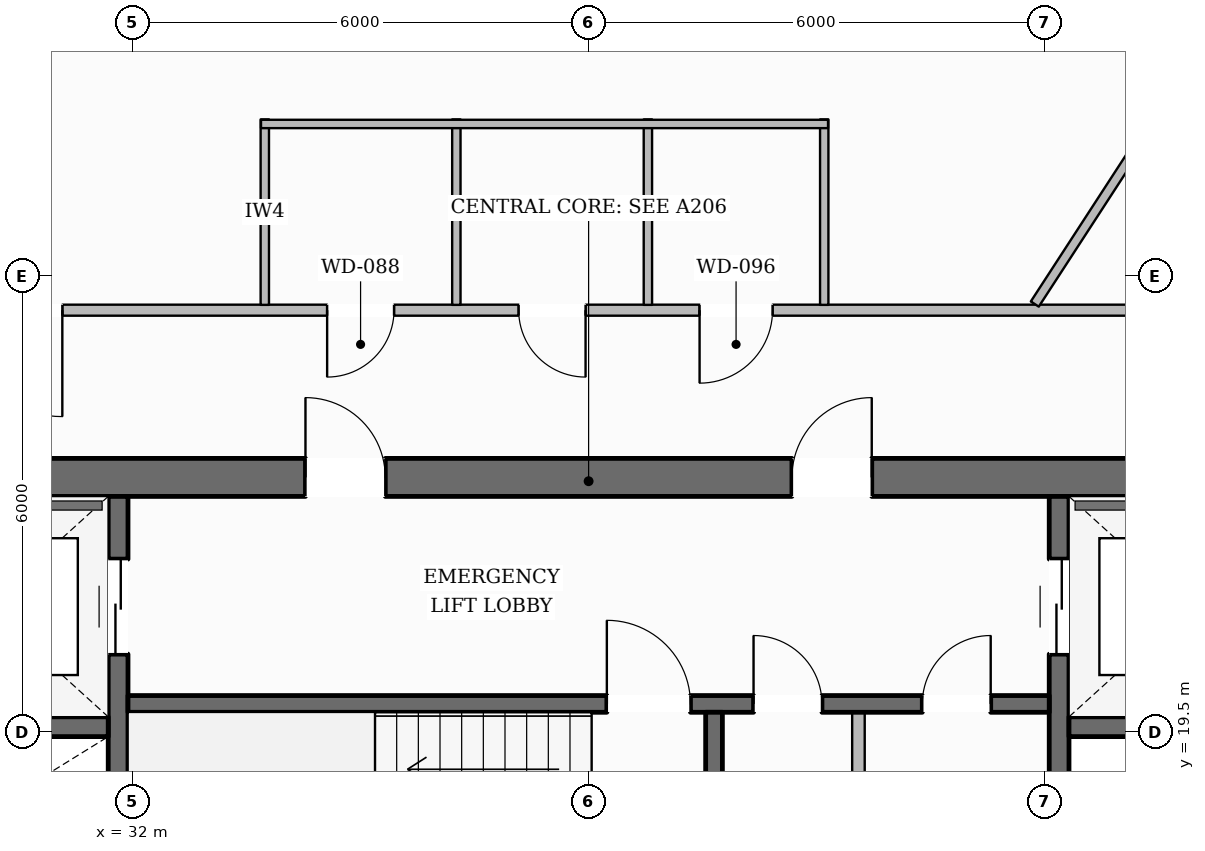
"""IFC4 building model, lengths in metres.
Left out: names, types, materials, properties, quantities, classifications, styles, units other than length and angle.
Written with IfcOpenShell. Run it as: python <this file> out.ifc"""

import sys

from ifc_helpers import new_model, si_unit, direction, frame, frame_2d, origin, place, context, subcontext, project, spatial, rectangle, extrude, element, fill, save


model = new_model("IFC4")
c1 = context("Model", 3, precision=1e-05, world=origin(), true_north=direction((0.0, 1.0)))
c2 = subcontext(c1, "Body", "Model", "MODEL_VIEW")
j1 = project(units=[si_unit("LENGTHUNIT", "METRE"), si_unit("PLANEANGLEUNIT", "RADIAN")], contexts=[c1])
p1 = place(None, origin())
s1 = spatial("IfcSite", under=j1, at=p1, CompositionType="ELEMENT")
p2 = place(p1, origin())
s2 = spatial("IfcBuilding", under=s1, at=p2, CompositionType="ELEMENT")
p3 = place(p2, frame((0.0, 0.0, 143.25)))
s3 = spatial("IfcBuildingStorey", under=s2, at=p3, CompositionType="ELEMENT", Elevation=143.25)
p4 = place(p3, frame((27.98, 22.85, 0.0), z_axis=(0.0, 0.0, 1.0), x_axis=(1.0, 0.0, 0.0)))
e1 = element("IfcWall", 1, at=p4, inside=s3, PredefinedType="SOLIDWALL", context=c2, shape_type="SweptSolid", body=[
    extrude(rectangle(XDim=20.04, YDim=0.5, at=frame_2d((10.02, 0.0))), origin(), (0.0, 0.0, 1.0), 3.6),
])
p5 = place(p4, frame((6.295, 0.0, 0.0)))
e2 = element("IfcOpeningElement", 2, at=p5, cuts=e1, PredefinedType="OPENING", context=c2, shape_type="SweptSolid", body=[
    extrude(rectangle(XDim=1.05, YDim=2.15, at=frame_2d((0.525, 1.075))), frame((0.0, 0.26, 0.0), z_axis=(0.0, -1.0, 0.0), x_axis=(1.0, 0.0, 0.0)), (0.0, 0.0, 1.0), 0.52),
])
p6 = place(p4, frame((12.695, 0.0, 0.0)))
e3 = element("IfcOpeningElement", 3, at=p6, cuts=e1, PredefinedType="OPENING", context=c2, shape_type="SweptSolid", body=[
    extrude(rectangle(XDim=1.05, YDim=2.15, at=frame_2d((0.525, 1.075))), frame((0.0, 0.26, 0.0), z_axis=(0.0, -1.0, 0.0), x_axis=(1.0, 0.0, 0.0)), (0.0, 0.0, 1.0), 0.52),
])
p7 = place(p3, frame((31.81, 9.6, 0.0), z_axis=(0.0, 0.0, 1.0), x_axis=(0.0, 1.0, 0.0)))
e4 = element("IfcWall", 4, at=p7, inside=s3, PredefinedType="SHEAR", context=c2, shape_type="SweptSolid", body=[
    extrude(rectangle(XDim=13.0, YDim=0.26, at=frame_2d((6.5, 0.0))), origin(), (0.0, 0.0, 1.0), 3.6),
])
p8 = place(p7, frame((10.925, 0.0, 0.0)))
e5 = element("IfcOpeningElement", 5, at=p8, cuts=e4, PredefinedType="OPENING", context=c2, shape_type="SweptSolid", body=[
    extrude(rectangle(XDim=1.25, YDim=2.25, at=frame_2d((0.625, 1.125))), frame((0.0, 0.14, 0.0), z_axis=(0.0, -1.0, 0.0), x_axis=(1.0, 0.0, 0.0)), (0.0, 0.0, 1.0), 0.28),
])
p9 = place(p3, frame((44.19, 9.6, 0.0), z_axis=(0.0, 0.0, 1.0), x_axis=(0.0, 1.0, 0.0)))
e6 = element("IfcWall", 6, at=p9, inside=s3, PredefinedType="SHEAR", context=c2, shape_type="SweptSolid", body=[
    extrude(rectangle(XDim=13.0, YDim=0.26, at=frame_2d((6.5, 0.0))), origin(), (0.0, 0.0, 1.0), 3.6),
])
p10 = place(p9, frame((10.925, 0.0, 0.0)))
e7 = element("IfcOpeningElement", 7, at=p10, cuts=e6, PredefinedType="OPENING", context=c2, shape_type="SweptSolid", body=[
    extrude(rectangle(XDim=1.25, YDim=2.25, at=frame_2d((0.625, 1.125))), frame((0.0, 0.14, 0.0), z_axis=(0.0, -1.0, 0.0), x_axis=(1.0, 0.0, 0.0)), (0.0, 0.0, 1.0), 0.28),
])
for number, where, z_axis, x_axis in (
    (8, (28.48, 19.57, 0.0), (0.0, 0.0, 1.0), (1.0, 0.0, 0.0)),
    (9, (44.32, 19.57, 0.0), (0.0, 0.0, 1.0), (1.0, 0.0, 0.0)),
):
    element("IfcWall", number, at=place(p3, frame(where, z_axis=z_axis, x_axis=x_axis)), inside=s3, PredefinedType="SHEAR", context=c2, shape_type="SweptSolid", body=[
        extrude(rectangle(XDim=3.2, YDim=0.26, at=frame_2d((1.6, 0.0))), origin(), (0.0, 0.0, 1.0), 3.6),
    ])
p11 = place(p3, frame((31.94, 19.87, 0.0), z_axis=(0.0, 0.0, 1.0), x_axis=(1.0, 0.0, 0.0)))
e10 = element("IfcWall", 10, at=p11, inside=s3, PredefinedType="SOLIDWALL", context=c2, shape_type="SweptSolid", body=[
    extrude(rectangle(XDim=12.12, YDim=0.22, at=frame_2d((6.06, 0.0))), origin(), (0.0, 0.0, 1.0), 3.6),
])
p12 = place(p11, frame((6.3, 0.0, 0.0)))
e11 = element("IfcOpeningElement", 11, at=p12, cuts=e10, PredefinedType="OPENING", context=c2, shape_type="SweptSolid", body=[
    extrude(rectangle(XDim=1.1, YDim=2.15, at=frame_2d((0.55, 1.075))), frame((0.0, 0.12, 0.0), z_axis=(0.0, -1.0, 0.0), x_axis=(1.0, 0.0, 0.0)), (0.0, 0.0, 1.0), 0.24),
])
p13 = place(p11, frame((8.23, 0.0, 0.0)))
e12 = element("IfcOpeningElement", 12, at=p13, cuts=e10, PredefinedType="OPENING", context=c2, shape_type="SweptSolid", body=[
    extrude(rectangle(XDim=0.9, YDim=2.1, at=frame_2d((0.45, 1.05))), frame((0.0, 0.12, 0.0), z_axis=(0.0, -1.0, 0.0), x_axis=(1.0, 0.0, 0.0)), (0.0, 0.0, 1.0), 0.24),
])
p14 = place(p11, frame((10.45, 0.0, 0.0)))
e13 = element("IfcOpeningElement", 13, at=p14, cuts=e10, PredefinedType="OPENING", context=c2, shape_type="SweptSolid", body=[
    extrude(rectangle(XDim=0.9, YDim=2.1, at=frame_2d((0.45, 1.05))), frame((0.0, 0.12, 0.0), z_axis=(0.0, -1.0, 0.0), x_axis=(1.0, 0.0, 0.0)), (0.0, 0.0, 1.0), 0.24),
])
p15 = place(p3, frame((39.65, 16.56, 0.0), z_axis=(0.0, 0.0, 1.0), x_axis=(0.0, 1.0, 0.0)))
e14 = element("IfcWall", 14, at=p15, inside=s3, PredefinedType="SOLIDWALL", context=c2, shape_type="SweptSolid", body=[
    extrude(rectangle(XDim=3.2, YDim=0.22, at=frame_2d((1.6, 0.0))), origin(), (0.0, 0.0, 1.0), 3.6),
])
p16 = place(p3, frame((13.223, 11.91, 0.0), z_axis=(0.0, 0.0, 1.0), x_axis=(0.505453242286, 0.86285399684, 0.0)))
e15 = element("IfcWall", 15, at=p16, inside=s3, PredefinedType="STANDARD", context=c2, shape_type="SweptSolid", body=[
    extrude(rectangle(XDim=38.125, YDim=0.38, at=frame_2d((19.062, 0.0))), origin(), (0.0, 0.0, 1.0), 3.059),
])
p17 = place(p16, frame((27.994, 0.0, 0.0)))
e16 = element("IfcOpeningElement", 16, at=p17, cuts=e15, PredefinedType="OPENING", context=c2, shape_type="SweptSolid", body=[
    extrude(rectangle(XDim=1.0, YDim=2.2, at=frame_2d((0.5, 1.1))), frame((0.0, 0.2, 0.0), z_axis=(0.0, -1.0, 0.0), x_axis=(1.0, 0.0, 0.0)), (0.0, 0.0, 1.0), 0.4),
])
p18 = place(p16, frame((33.78, 0.0, 0.65)))
e17 = element("IfcOpeningElement", 17, at=p18, cuts=e15, PredefinedType="OPENING", context=c2, shape_type="SweptSolid", body=[
    extrude(rectangle(XDim=1.55, YDim=1.75, at=frame_2d((0.775, 0.875))), frame((0.0, 0.2, 0.0), z_axis=(0.0, -1.0, 0.0), x_axis=(1.0, 0.0, 0.0)), (0.0, 0.0, 1.0), 0.4),
])
p19 = place(p16, frame((21.388, 0.0, 0.65)))
e18 = element("IfcOpeningElement", 18, at=p19, cuts=e15, PredefinedType="OPENING", context=c2, shape_type="SweptSolid", body=[
    extrude(rectangle(XDim=1.55, YDim=1.75, at=frame_2d((0.775, 0.875))), frame((0.0, 0.2, 0.0), z_axis=(0.0, -1.0, 0.0), x_axis=(1.0, 0.0, 0.0)), (0.0, 0.0, 1.0), 0.4),
])
p20 = place(p16, frame((8.997, 0.0, 0.65)))
e19 = element("IfcOpeningElement", 19, at=p20, cuts=e15, PredefinedType="OPENING", context=c2, shape_type="SweptSolid", body=[
    extrude(rectangle(XDim=1.55, YDim=1.75, at=frame_2d((0.775, 0.875))), frame((0.0, 0.2, 0.0), z_axis=(0.0, -1.0, 0.0), x_axis=(1.0, 0.0, 0.0)), (0.0, 0.0, 1.0), 0.4),
])
p21 = place(p16, frame((2.802, 0.0, 0.65)))
e20 = element("IfcOpeningElement", 20, at=p21, cuts=e15, PredefinedType="OPENING", context=c2, shape_type="SweptSolid", body=[
    extrude(rectangle(XDim=1.55, YDim=1.75, at=frame_2d((0.775, 0.875))), frame((0.0, 0.2, 0.0), z_axis=(0.0, -1.0, 0.0), x_axis=(1.0, 0.0, 0.0)), (0.0, 0.0, 1.0), 0.4),
])
p22 = place(p3, frame((43.361, 44.893, 0.0), z_axis=(0.0, 0.0, 1.0), x_axis=(0.499094622433, -0.866547493135, 0.0)))
e21 = element("IfcWall", 21, at=p22, inside=s3, PredefinedType="STANDARD", context=c2, shape_type="SweptSolid", body=[
    extrude(rectangle(XDim=37.644, YDim=0.38, at=frame_2d((18.822, 0.0))), origin(), (0.0, 0.0, 1.0), 3.059),
])
p23 = place(p22, frame((33.333, 0.0, 0.65)))
e22 = element("IfcOpeningElement", 22, at=p23, cuts=e21, PredefinedType="OPENING", context=c2, shape_type="SweptSolid", body=[
    extrude(rectangle(XDim=1.55, YDim=1.75, at=frame_2d((0.775, 0.875))), frame((0.0, 0.2, 0.0), z_axis=(0.0, -1.0, 0.0), x_axis=(1.0, 0.0, 0.0)), (0.0, 0.0, 1.0), 0.4),
])
p24 = place(p22, frame((27.219, 0.0, 0.65)))
e23 = element("IfcOpeningElement", 23, at=p24, cuts=e21, PredefinedType="OPENING", context=c2, shape_type="SweptSolid", body=[
    extrude(rectangle(XDim=1.55, YDim=1.75, at=frame_2d((0.775, 0.875))), frame((0.0, 0.2, 0.0), z_axis=(0.0, -1.0, 0.0), x_axis=(1.0, 0.0, 0.0)), (0.0, 0.0, 1.0), 0.4),
])
p25 = place(p22, frame((21.105, 0.0, 0.65)))
e24 = element("IfcOpeningElement", 24, at=p25, cuts=e21, PredefinedType="OPENING", context=c2, shape_type="SweptSolid", body=[
    extrude(rectangle(XDim=1.55, YDim=1.75, at=frame_2d((0.775, 0.875))), frame((0.0, 0.2, 0.0), z_axis=(0.0, -1.0, 0.0), x_axis=(1.0, 0.0, 0.0)), (0.0, 0.0, 1.0), 0.4),
])
p26 = place(p22, frame((8.876, 0.0, 0.65)))
e25 = element("IfcOpeningElement", 25, at=p26, cuts=e21, PredefinedType="OPENING", context=c2, shape_type="SweptSolid", body=[
    extrude(rectangle(XDim=1.55, YDim=1.75, at=frame_2d((0.775, 0.875))), frame((0.0, 0.2, 0.0), z_axis=(0.0, -1.0, 0.0), x_axis=(1.0, 0.0, 0.0)), (0.0, 0.0, 1.0), 0.4),
])
p27 = place(p22, frame((2.762, 0.0, 0.65)))
e26 = element("IfcOpeningElement", 26, at=p27, cuts=e21, PredefinedType="OPENING", context=c2, shape_type="SweptSolid", body=[
    extrude(rectangle(XDim=1.55, YDim=1.75, at=frame_2d((0.775, 0.875))), frame((0.0, 0.2, 0.0), z_axis=(0.0, -1.0, 0.0), x_axis=(1.0, 0.0, 0.0)), (0.0, 0.0, 1.0), 0.4),
])
p28 = place(p3, frame((41.55, 16.56, 0.0), z_axis=(0.0, 0.0, 1.0), x_axis=(0.0, 1.0, 0.0)))
e27 = element("IfcWall", 27, at=p28, inside=s3, PredefinedType="PARTITIONING", context=c2, shape_type="SweptSolid", body=[
    extrude(rectangle(XDim=3.2, YDim=0.165, at=frame_2d((1.6, 0.0))), origin(), (0.0, 0.0, 1.0), 3.6),
])
p29 = place(p3, frame((49.97, 25.05, 0.0), z_axis=(0.0, 0.0, 1.0), x_axis=(-1.0, 0.0, 0.0)))
e28 = element("IfcWall", 28, at=p29, inside=s3, PredefinedType="PARTITIONING", context=c2, shape_type="SweptSolid", body=[
    extrude(rectangle(XDim=23.94, YDim=0.145, at=frame_2d((11.97, 0.0))), origin(), (0.0, 0.0, 1.0), 3.6),
])
p30 = place(p29, frame((14.53, 0.0, 0.0)))
e29 = element("IfcOpeningElement", 29, at=p30, cuts=e28, PredefinedType="OPENING", context=c2, shape_type="SweptSolid", body=[
    extrude(rectangle(XDim=0.88, YDim=2.1, at=frame_2d((0.44, 1.05))), frame((0.0, 0.083, 0.0), z_axis=(0.0, -1.0, 0.0), x_axis=(1.0, 0.0, 0.0)), (0.0, 0.0, 1.0), 0.165),
])
p31 = place(p29, frame((12.01, 0.0, 0.0)))
e30 = element("IfcOpeningElement", 30, at=p31, cuts=e28, PredefinedType="OPENING", context=c2, shape_type="SweptSolid", body=[
    extrude(rectangle(XDim=0.88, YDim=2.1, at=frame_2d((0.44, 1.05))), frame((0.0, 0.083, 0.0), z_axis=(0.0, -1.0, 0.0), x_axis=(1.0, 0.0, 0.0)), (0.0, 0.0, 1.0), 0.165),
])
p32 = place(p29, frame((9.55, 0.0, 0.0)))
e31 = element("IfcOpeningElement", 31, at=p32, cuts=e28, PredefinedType="OPENING", context=c2, shape_type="SweptSolid", body=[
    extrude(rectangle(XDim=0.96, YDim=2.1, at=frame_2d((0.48, 1.05))), frame((0.0, 0.083, 0.0), z_axis=(0.0, -1.0, 0.0), x_axis=(1.0, 0.0, 0.0)), (0.0, 0.0, 1.0), 0.165),
])
p33 = place(p29, frame((18.894, 0.0, 0.0)))
e32 = element("IfcOpeningElement", 32, at=p33, cuts=e28, PredefinedType="OPENING", context=c2, shape_type="SweptSolid", body=[
    extrude(rectangle(XDim=1.4, YDim=2.2, at=frame_2d((0.7, 1.1))), frame((0.0, 0.083, 0.0), z_axis=(0.0, -1.0, 0.0), x_axis=(1.0, 0.0, 0.0)), (0.0, 0.0, 1.0), 0.165),
])
for number, where, z_axis, x_axis in (
    (33, (33.74, 25.12, 0.0), (0.0, 0.0, 1.0), (0.0, 1.0, 0.0)),
    (34, (36.26, 25.12, 0.0), (0.0, 0.0, 1.0), (0.0, 1.0, 0.0)),
    (35, (38.78, 25.12, 0.0), (0.0, 0.0, 1.0), (0.0, 1.0, 0.0)),
    (36, (41.1, 25.12, 0.0), (0.0, 0.0, 1.0), (0.0, 1.0, 0.0)),
):
    element("IfcWall", number, at=place(p3, frame(where, z_axis=z_axis, x_axis=x_axis)), inside=s3, PredefinedType="PLUMBINGWALL", context=c2, shape_type="SweptSolid", body=[
        extrude(rectangle(XDim=2.44, YDim=0.11, at=frame_2d((1.22, 0.0))), origin(), (0.0, 0.0, 1.0), 3.6),
    ])
p34 = place(p3, frame((33.69, 27.5, 0.0), z_axis=(0.0, 0.0, 1.0), x_axis=(1.0, 0.0, 0.0)))
e37 = element("IfcWall", 37, at=p34, inside=s3, PredefinedType="PLUMBINGWALL", context=c2, shape_type="SweptSolid", body=[
    extrude(rectangle(XDim=7.46, YDim=0.11, at=frame_2d((3.73, 0.0))), origin(), (0.0, 0.0, 1.0), 3.6),
])
p35 = place(p3, frame((43.87, 25.131, 0.0), z_axis=(0.0, 0.0, 1.0), x_axis=(0.545017140764, 0.838424901988, 0.0)))
e38 = element("IfcWall", 38, at=p35, inside=s3, PredefinedType="PARTITIONING", context=c2, shape_type="SweptSolid", body=[
    extrude(rectangle(XDim=9.836, YDim=0.125, at=frame_2d((4.918, 0.0))), origin(), (0.0, 0.0, 1.0), 3.6),
])
p36 = place(p12, origin())
e39 = element("IfcDoor", 39, at=p36, inside=s3, OperationType="SINGLE_SWING_LEFT", PredefinedType="DOOR", context=c2, shape_type="SweptSolid", body=[
    extrude(rectangle(XDim=1.1, YDim=2.15, at=frame_2d((0.55, 1.075))), frame((0.0, 0.025, 0.0), z_axis=(0.0, -1.0, 0.0), x_axis=(1.0, 0.0, 0.0)), (0.0, 0.0, 1.0), 0.05),
])
fill(e11, e39)
p37 = place(p5, origin())
e40 = element("IfcDoor", 40, at=p37, inside=s3, OperationType="SINGLE_SWING_LEFT", PredefinedType="DOOR", context=c2, shape_type="SweptSolid", body=[
    extrude(rectangle(XDim=1.05, YDim=2.15, at=frame_2d((0.525, 1.075))), frame((0.0, 0.025, 0.0), z_axis=(0.0, -1.0, 0.0), x_axis=(1.0, 0.0, 0.0)), (0.0, 0.0, 1.0), 0.05),
])
fill(e2, e40)
p38 = place(p6, origin())
e41 = element("IfcDoor", 41, at=p38, inside=s3, OperationType="SINGLE_SWING_RIGHT", PredefinedType="DOOR", context=c2, shape_type="SweptSolid", body=[
    extrude(rectangle(XDim=1.05, YDim=2.15, at=frame_2d((0.525, 1.075))), frame((0.0, 0.025, 0.0), z_axis=(0.0, -1.0, 0.0), x_axis=(1.0, 0.0, 0.0)), (0.0, 0.0, 1.0), 0.05),
])
fill(e3, e41)
p39 = place(p8, origin())
e42 = element("IfcDoor", 42, at=p39, inside=s3, OperationType="DOUBLE_DOOR_SLIDING", PredefinedType="DOOR", context=c2, shape_type="SweptSolid", body=[
    extrude(rectangle(XDim=1.25, YDim=2.25, at=frame_2d((0.625, 1.125))), frame((0.0, 0.025, 0.0), z_axis=(0.0, -1.0, 0.0), x_axis=(1.0, 0.0, 0.0)), (0.0, 0.0, 1.0), 0.05),
])
fill(e5, e42)
p40 = place(p10, origin())
e43 = element("IfcDoor", 43, at=p40, inside=s3, OperationType="DOUBLE_DOOR_SLIDING", PredefinedType="DOOR", context=c2, shape_type="SweptSolid", body=[
    extrude(rectangle(XDim=1.25, YDim=2.25, at=frame_2d((0.625, 1.125))), frame((0.0, 0.025, 0.0), z_axis=(0.0, -1.0, 0.0), x_axis=(1.0, 0.0, 0.0)), (0.0, 0.0, 1.0), 0.05),
])
fill(e7, e43)
p41 = place(p13, origin())
e44 = element("IfcDoor", 44, at=p41, inside=s3, OperationType="SINGLE_SWING_LEFT", PredefinedType="DOOR", context=c2, shape_type="SweptSolid", body=[
    extrude(rectangle(XDim=0.9, YDim=2.1, at=frame_2d((0.45, 1.05))), frame((0.0, 0.025, 0.0), z_axis=(0.0, -1.0, 0.0), x_axis=(1.0, 0.0, 0.0)), (0.0, 0.0, 1.0), 0.05),
])
fill(e12, e44)
p42 = place(p14, origin())
e45 = element("IfcDoor", 45, at=p42, inside=s3, OperationType="SINGLE_SWING_RIGHT", PredefinedType="DOOR", context=c2, shape_type="SweptSolid", body=[
    extrude(rectangle(XDim=0.9, YDim=2.1, at=frame_2d((0.45, 1.05))), frame((0.0, 0.025, 0.0), z_axis=(0.0, -1.0, 0.0), x_axis=(1.0, 0.0, 0.0)), (0.0, 0.0, 1.0), 0.05),
])
fill(e13, e45)
p43 = place(p30, origin())
e46 = element("IfcDoor", 46, at=p43, inside=s3, OperationType="SINGLE_SWING_RIGHT", PredefinedType="DOOR", context=c2, shape_type="SweptSolid", body=[
    extrude(rectangle(XDim=0.88, YDim=2.1, at=frame_2d((0.44, 1.05))), frame((0.0, 0.025, 0.0), z_axis=(0.0, -1.0, 0.0), x_axis=(1.0, 0.0, 0.0)), (0.0, 0.0, 1.0), 0.05),
])
fill(e29, e46)
p44 = place(p31, origin())
e47 = element("IfcDoor", 47, at=p44, inside=s3, OperationType="SINGLE_SWING_LEFT", PredefinedType="DOOR", context=c2, shape_type="SweptSolid", body=[
    extrude(rectangle(XDim=0.88, YDim=2.1, at=frame_2d((0.44, 1.05))), frame((0.0, 0.025, 0.0), z_axis=(0.0, -1.0, 0.0), x_axis=(1.0, 0.0, 0.0)), (0.0, 0.0, 1.0), 0.05),
])
fill(e30, e47)
p45 = place(p32, origin())
e48 = element("IfcDoor", 48, at=p45, inside=s3, OperationType="SINGLE_SWING_RIGHT", PredefinedType="DOOR", context=c2, shape_type="SweptSolid", body=[
    extrude(rectangle(XDim=0.96, YDim=2.1, at=frame_2d((0.48, 1.05))), frame((0.0, 0.025, 0.0), z_axis=(0.0, -1.0, 0.0), x_axis=(1.0, 0.0, 0.0)), (0.0, 0.0, 1.0), 0.05),
])
fill(e31, e48)
p46 = place(p33, origin())
e49 = element("IfcDoor", 49, at=p46, inside=s3, OperationType="SINGLE_SWING_LEFT", PredefinedType="DOOR", context=c2, shape_type="SweptSolid", body=[
    extrude(rectangle(XDim=1.4, YDim=2.2, at=frame_2d((0.7, 1.1))), frame((0.0, 0.025, 0.0), z_axis=(0.0, -1.0, 0.0), x_axis=(1.0, 0.0, 0.0)), (0.0, 0.0, 1.0), 0.05),
])
fill(e32, e49)
save(model, sys.argv[1])
